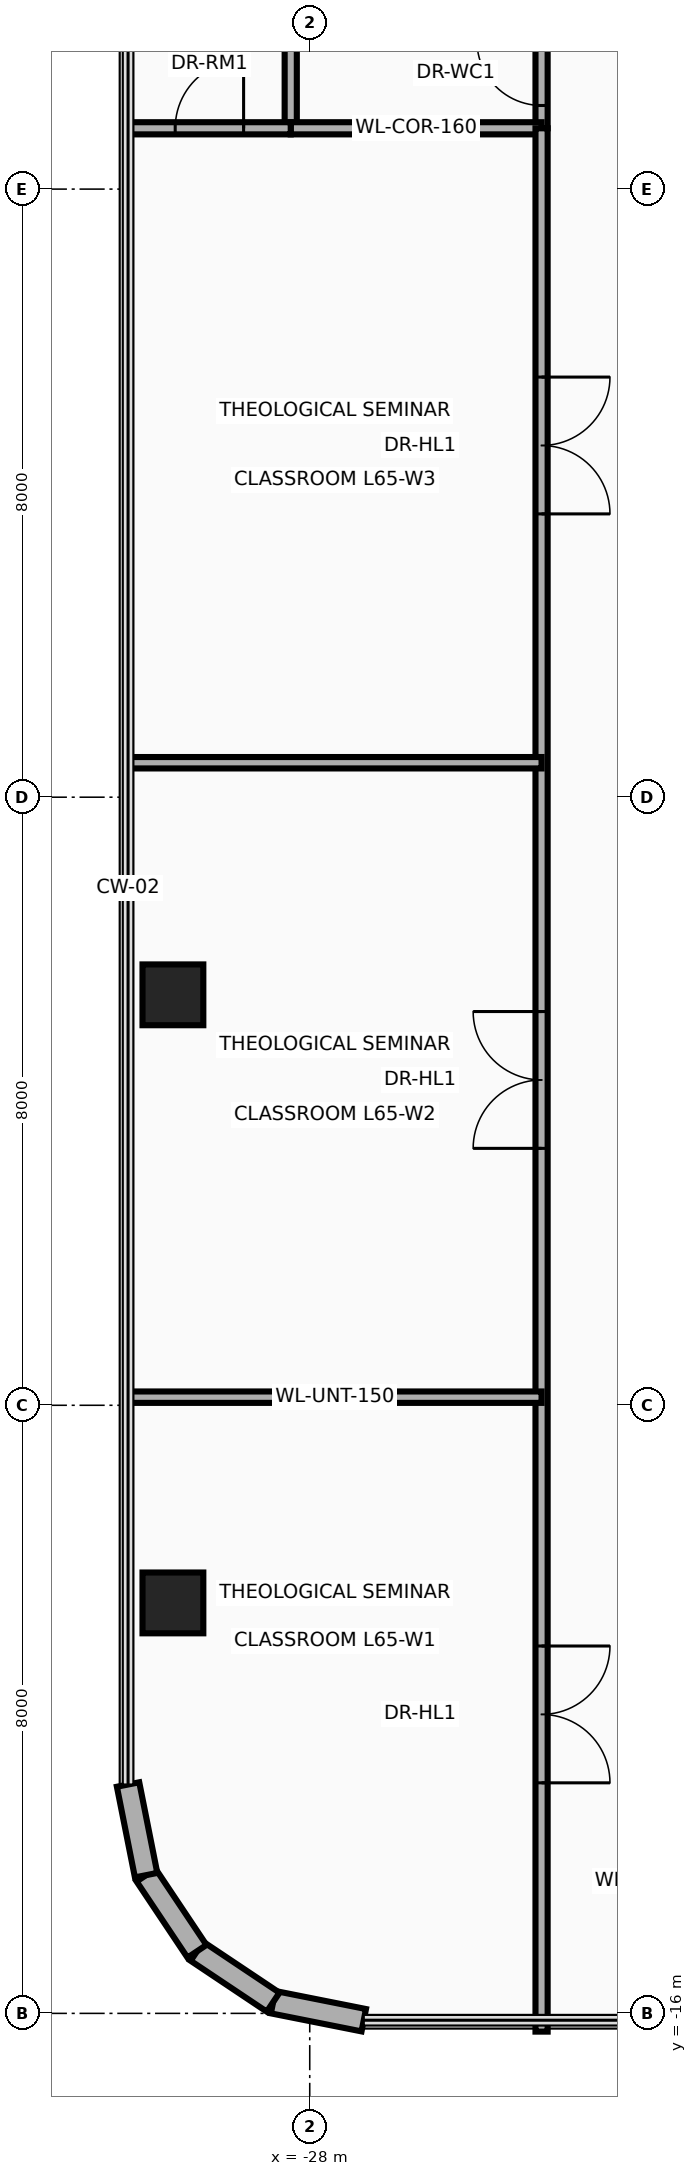
"""IFC4 building model, lengths in metres.
Left out: names, types, materials, properties, quantities, classifications, styles, units other than length and angle.
Written with IfcOpenShell. Run it as: python <this file> out.ifc"""

import sys

from ifc_helpers import new_model, si_unit, direction, frame, frame_2d, origin, origin_2d, place, context, subcontext, project, spatial, rectangle, extrude, source, transform, mapped, element, fill, save


model = new_model("IFC4")
c1 = context("Model", 3, precision=1e-05, world=origin(), true_north=direction((0.0, 1.0)))
c2 = subcontext(c1, "Body", "Model", "MODEL_VIEW")
j1 = project(units=[si_unit("LENGTHUNIT", "METRE"), si_unit("PLANEANGLEUNIT", "RADIAN")], contexts=[c1])
p1 = place(None, origin())
s1 = spatial("IfcSite", under=j1, at=p1, CompositionType="ELEMENT")
p2 = place(p1, origin())
s2 = spatial("IfcBuilding", under=s1, at=p2, CompositionType="ELEMENT")
p3 = place(p2, frame((0.0, 0.0, 251.0)))
s3 = spatial("IfcBuildingStorey", under=s2, at=p3, CompositionType="ELEMENT", Elevation=251.0)
m1 = source(origin(), c2, "Body", "SweptSolid", [
    extrude(rectangle(XDim=0.8, YDim=0.8, at=origin_2d()), origin(), (0.0, 0.0, 1.0), 3.5),
])
for number, where, z_axis, x_axis in (
    (1, (-29.8, -10.6, 0.0), (0.0, 0.0, 1.0), (1.0, 0.0, 0.0)),
    (2, (-29.8, -2.6, 0.0), (0.0, 0.0, 1.0), (1.0, 0.0, 0.0)),
):
    element("IfcColumn", number, at=place(p3, frame(where, z_axis=z_axis, x_axis=x_axis)), inside=s3, PredefinedType="COLUMN", context=c2, shape_type="MappedRepresentation", body=[
        mapped(m1, transform((0.0, 0.0, 0.0), x_axis=(1.0, 0.0, 0.0), y_axis=(0.0, 1.0, 0.0), z_axis=(0.0, 0.0, 1.0), scale=1.0)),
    ])
p4 = place(p3, frame((-27.289, -16.09, 0.0), z_axis=(0.0, 0.0, 1.0), x_axis=(-0.980765602568, 0.195189223115, 0.0)))
e3 = element("IfcWall", 3, at=p4, inside=s3, PredefinedType="SOLIDWALL", context=c2, shape_type="SweptSolid", body=[
    extrude(rectangle(XDim=1.216, YDim=0.3, at=frame_2d((0.608, 0.0))), origin(), (0.0, 0.0, 1.0), 3.26),
])
for number, where, z_axis, x_axis in (
    (4, (-28.482, -15.853, 0.0), (0.0, 0.0, 1.0), (-0.831, 0.556, 0.0)),
    (5, (-29.483, -15.183, 0.0), (0.0, 0.0, 1.0), (-0.556, 0.831, 0.0)),
):
    element("IfcWall", number, at=place(p3, frame(where, z_axis=z_axis, x_axis=x_axis)), inside=s3, PredefinedType="SOLIDWALL", context=c2, shape_type="SweptSolid", body=[
        extrude(rectangle(XDim=1.205, YDim=0.3, at=frame_2d((0.603, 0.0))), origin(), (0.0, 0.0, 1.0), 3.26),
    ])
p5 = place(p3, frame((-30.153, -14.182, 0.0), z_axis=(0.0, 0.0, 1.0), x_axis=(-0.194996050505, 0.980804027463, 0.0)))
e6 = element("IfcWall", 6, at=p5, inside=s3, PredefinedType="SOLIDWALL", context=c2, shape_type="SweptSolid", body=[
    extrude(rectangle(XDim=1.216, YDim=0.3, at=frame_2d((0.608, 0.0))), origin(), (0.0, 0.0, 1.0), 3.26),
])
p6 = place(p3, frame((-28.25, 8.8, 0.0), z_axis=(0.0, 0.0, 1.0), x_axis=(0.0, 1.0, 0.0)))
e7 = element("IfcWall", 7, at=p6, inside=s3, PredefinedType="PARTITIONING", context=c2, shape_type="SweptSolid", body=[
    extrude(rectangle(XDim=2.6, YDim=0.16, at=frame_2d((1.3, 0.0))), origin(), (0.0, 0.0, 1.0), 2.544),
])
p7 = place(p3, frame((-24.95, 8.8, 0.0), z_axis=(0.0, 0.0, 1.0), x_axis=(0.0, 1.0, 0.0)))
e8 = element("IfcWall", 8, at=p7, inside=s3, PredefinedType="PARTITIONING", context=c2, shape_type="SweptSolid", body=[
    extrude(rectangle(XDim=2.6, YDim=0.16, at=frame_2d((1.3, 0.0))), origin(), (0.0, 0.0, 1.0), 2.544),
])
p8 = place(p7, frame((0.3, 0.0, 0.0)))
e9 = element("IfcOpeningElement", 9, at=p8, cuts=e8, PredefinedType="OPENING", context=c2, shape_type="SweptSolid", body=[
    extrude(rectangle(XDim=0.85, YDim=2.1, at=frame_2d((0.425, 1.05))), frame((0.0, 0.095, 0.0), z_axis=(0.0, -1.0, 0.0), x_axis=(1.0, 0.0, 0.0)), (0.0, 0.0, 1.0), 0.19),
])
p9 = place(p7, frame((1.45, 0.0, 0.0)))
e10 = element("IfcOpeningElement", 10, at=p9, cuts=e8, PredefinedType="OPENING", context=c2, shape_type="SweptSolid", body=[
    extrude(rectangle(XDim=0.85, YDim=2.1, at=frame_2d((0.425, 1.05))), frame((0.0, 0.095, 0.0), z_axis=(0.0, -1.0, 0.0), x_axis=(1.0, 0.0, 0.0)), (0.0, 0.0, 1.0), 0.19),
])
p10 = place(p3, frame((-28.25, 8.8, 0.0), z_axis=(0.0, 0.0, 1.0), x_axis=(1.0, 0.0, 0.0)))
e11 = element("IfcWall", 11, at=p10, inside=s3, PredefinedType="PARTITIONING", context=c2, shape_type="SweptSolid", body=[
    extrude(rectangle(XDim=3.3, YDim=0.16, at=frame_2d((1.65, 0.0))), origin(), (0.0, 0.0, 1.0), 3.26),
])
p11 = place(p3, frame((-24.95, -16.24, 0.0), z_axis=(0.0, 0.0, 1.0), x_axis=(0.0, 1.0, 0.0)))
e12 = element("IfcWall", 12, at=p11, inside=s3, PredefinedType="PARTITIONING", context=c2, shape_type="SweptSolid", body=[
    extrude(rectangle(XDim=25.04, YDim=0.16, at=frame_2d((12.52, 0.0))), origin(), (0.0, 0.0, 1.0), 2.544),
])
p12 = place(p11, frame((3.273, 0.0, 0.0)))
e13 = element("IfcOpeningElement", 13, at=p12, cuts=e12, PredefinedType="OPENING", context=c2, shape_type="SweptSolid", body=[
    extrude(rectangle(XDim=1.8, YDim=2.15, at=frame_2d((0.9, 1.075))), frame((0.0, 0.095, 0.0), z_axis=(0.0, -1.0, 0.0), x_axis=(1.0, 0.0, 0.0)), (0.0, 0.0, 1.0), 0.19),
])
p13 = place(p11, frame((11.62, 0.0, 0.0)))
e14 = element("IfcOpeningElement", 14, at=p13, cuts=e12, PredefinedType="OPENING", context=c2, shape_type="SweptSolid", body=[
    extrude(rectangle(XDim=1.8, YDim=2.15, at=frame_2d((0.9, 1.075))), frame((0.0, 0.095, 0.0), z_axis=(0.0, -1.0, 0.0), x_axis=(1.0, 0.0, 0.0)), (0.0, 0.0, 1.0), 0.19),
])
p14 = place(p11, frame((19.967, 0.0, 0.0)))
e15 = element("IfcOpeningElement", 15, at=p14, cuts=e12, PredefinedType="OPENING", context=c2, shape_type="SweptSolid", body=[
    extrude(rectangle(XDim=1.8, YDim=2.15, at=frame_2d((0.9, 1.075))), frame((0.0, 0.095, 0.0), z_axis=(0.0, -1.0, 0.0), x_axis=(1.0, 0.0, 0.0)), (0.0, 0.0, 1.0), 0.19),
])
p15 = place(p3, frame((-30.39, 8.8, 0.0), z_axis=(0.0, 0.0, 1.0), x_axis=(1.0, 0.0, 0.0)))
e16 = element("IfcWall", 16, at=p15, inside=s3, PredefinedType="PARTITIONING", context=c2, shape_type="SweptSolid", body=[
    extrude(rectangle(XDim=2.14, YDim=0.16, at=frame_2d((1.07, 0.0))), origin(), (0.0, 0.0, 1.0), 2.706),
])
p16 = place(p15, frame((0.62, 0.0, 0.0)))
e17 = element("IfcOpeningElement", 17, at=p16, cuts=e16, PredefinedType="OPENING", context=c2, shape_type="SweptSolid", body=[
    extrude(rectangle(XDim=0.9, YDim=2.1, at=frame_2d((0.45, 1.05))), frame((0.0, 0.095, 0.0), z_axis=(0.0, -1.0, 0.0), x_axis=(1.0, 0.0, 0.0)), (0.0, 0.0, 1.0), 0.19),
])
for number, where, z_axis, x_axis in (
    (18, (-30.39, -7.893, 0.0), (0.0, 0.0, 1.0), (1.0, 0.0, 0.0)),
    (19, (-30.39, 0.453, 0.0), (0.0, 0.0, 1.0), (1.0, 0.0, 0.0)),
):
    element("IfcWall", number, at=place(p3, frame(where, z_axis=z_axis, x_axis=x_axis)), inside=s3, PredefinedType="PARTITIONING", context=c2, shape_type="SweptSolid", body=[
        extrude(rectangle(XDim=5.44, YDim=0.15, at=frame_2d((2.72, 0.0))), origin(), (0.0, 0.0, 1.0), 2.706),
    ])
p17 = place(p8, origin())
e20 = element("IfcDoor", 20, at=p17, inside=s3, OperationType="SINGLE_SWING_RIGHT", PredefinedType="DOOR", context=c2, shape_type="SweptSolid", body=[
    extrude(rectangle(XDim=0.85, YDim=2.1, at=frame_2d((0.425, 1.05))), frame((0.0, 0.025, 0.0), z_axis=(0.0, -1.0, 0.0), x_axis=(1.0, 0.0, 0.0)), (0.0, 0.0, 1.0), 0.05),
])
fill(e9, e20)
p18 = place(p16, origin())
e21 = element("IfcDoor", 21, at=p18, inside=s3, OperationType="SINGLE_SWING_RIGHT", PredefinedType="DOOR", context=c2, shape_type="SweptSolid", body=[
    extrude(rectangle(XDim=0.9, YDim=2.1, at=frame_2d((0.45, 1.05))), frame((0.0, 0.025, 0.0), z_axis=(0.0, -1.0, 0.0), x_axis=(1.0, 0.0, 0.0)), (0.0, 0.0, 1.0), 0.05),
])
fill(e17, e21)
p19 = place(p12, frame((1.8, 0.0, 0.0), z_axis=(0.0, 0.0, 1.0), x_axis=(-1.0, 0.0, 0.0)))
e22 = element("IfcDoor", 22, at=p19, inside=s3, OperationType="DOUBLE_DOOR_SINGLE_SWING", PredefinedType="DOOR", context=c2, shape_type="SweptSolid", body=[
    extrude(rectangle(XDim=1.8, YDim=2.15, at=frame_2d((0.9, 1.075))), frame((0.0, 0.025, 0.0), z_axis=(0.0, -1.0, 0.0), x_axis=(1.0, 0.0, 0.0)), (0.0, 0.0, 1.0), 0.05),
])
fill(e13, e22)
p20 = place(p13, origin())
e23 = element("IfcDoor", 23, at=p20, inside=s3, OperationType="DOUBLE_DOOR_SINGLE_SWING", PredefinedType="DOOR", context=c2, shape_type="SweptSolid", body=[
    extrude(rectangle(XDim=1.8, YDim=2.15, at=frame_2d((0.9, 1.075))), frame((0.0, 0.025, 0.0), z_axis=(0.0, -1.0, 0.0), x_axis=(1.0, 0.0, 0.0)), (0.0, 0.0, 1.0), 0.05),
])
fill(e14, e23)
p21 = place(p14, frame((1.8, 0.0, 0.0), z_axis=(0.0, 0.0, 1.0), x_axis=(-1.0, 0.0, 0.0)))
e24 = element("IfcDoor", 24, at=p21, inside=s3, OperationType="DOUBLE_DOOR_SINGLE_SWING", PredefinedType="DOOR", context=c2, shape_type="SweptSolid", body=[
    extrude(rectangle(XDim=1.8, YDim=2.15, at=frame_2d((0.9, 1.075))), frame((0.0, 0.025, 0.0), z_axis=(0.0, -1.0, 0.0), x_axis=(1.0, 0.0, 0.0)), (0.0, 0.0, 1.0), 0.05),
])
fill(e15, e24)
save(model, sys.argv[1])
